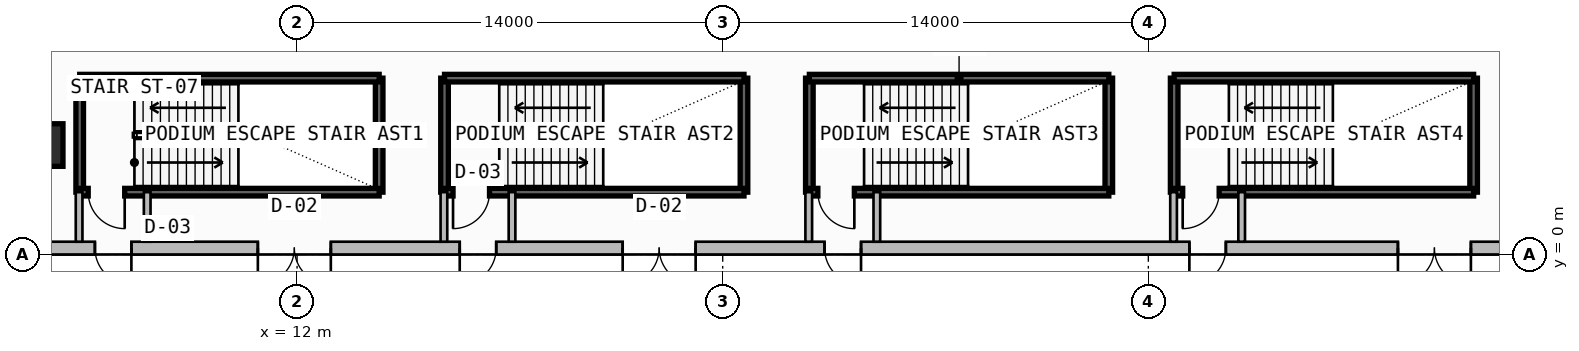
"""IFC4 building model, lengths in metres.
Left out: names, types, materials, properties, quantities, classifications, styles, units other than length and angle.
Written with IfcOpenShell. Run it as: python <this file> out.ifc"""

import sys

from ifc_helpers import new_model, si_unit, direction, frame, frame_2d, origin, origin_2d, place, context, subcontext, project, spatial, rectangle, extrude, element, fill, save


model = new_model("IFC4")
c1 = context("Model", 3, precision=1e-05, world=origin(), true_north=direction((0.0, 1.0)))
c2 = subcontext(c1, "Body", "Model", "MODEL_VIEW")
j1 = project(units=[si_unit("LENGTHUNIT", "METRE"), si_unit("PLANEANGLEUNIT", "RADIAN")], contexts=[c1])
p1 = place(None, origin())
s1 = spatial("IfcSite", under=j1, at=p1, CompositionType="ELEMENT")
p2 = place(p1, origin())
s2 = spatial("IfcBuilding", under=s1, at=p2, CompositionType="ELEMENT")
p3 = place(p2, origin())
s3 = spatial("IfcBuildingStorey", under=s2, at=p3, CompositionType="ELEMENT", Elevation=0.0)
p4 = place(p3, frame((3.6, 3.6, 0.0), z_axis=(0.0, 0.0, 1.0), x_axis=(1.0, 0.0, 0.0)))
e1 = element("IfcColumn", 1, at=p4, inside=s3, PredefinedType="COLUMN", context=c2, shape_type="SweptSolid", body=[
    extrude(rectangle(XDim=1.4, YDim=1.4, at=origin_2d()), origin(), (0.0, 0.0, 1.0), 4.5),
])
p5 = place(p3, frame((0.21, 0.21, 0.0), z_axis=(0.0, 0.0, 1.0), x_axis=(1.0, 0.0, 0.0)))
e2 = element("IfcWall", 2, at=p5, inside=s3, PredefinedType="SOLIDWALL", context=c2, shape_type="SweptSolid", body=[
    extrude(rectangle(XDim=51.79, YDim=0.42, at=frame_2d((25.895, 0.0))), origin(), (0.0, 0.0, 1.0), 4.18),
])
p6 = place(p5, frame((0.95, 0.0, 0.0)))
e3 = element("IfcOpeningElement", 3, at=p6, cuts=e2, PredefinedType="OPENING", context=c2, shape_type="SweptSolid", body=[
    extrude(rectangle(XDim=2.4, YDim=2.4, at=frame_2d((1.2, 1.2))), frame((0.0, 0.22, 0.0), z_axis=(0.0, -1.0, 0.0), x_axis=(1.0, 0.0, 0.0)), (0.0, 0.0, 1.0), 0.44),
])
p7 = place(p5, frame((10.5, 0.0, 0.0)))
e4 = element("IfcOpeningElement", 4, at=p7, cuts=e2, PredefinedType="OPENING", context=c2, shape_type="SweptSolid", body=[
    extrude(rectangle(XDim=2.4, YDim=2.4, at=frame_2d((1.2, 1.2))), frame((0.0, 0.22, 0.0), z_axis=(0.0, -1.0, 0.0), x_axis=(1.0, 0.0, 0.0)), (0.0, 0.0, 1.0), 0.44),
])
p8 = place(p5, frame((22.5, 0.0, 0.0)))
e5 = element("IfcOpeningElement", 5, at=p8, cuts=e2, PredefinedType="OPENING", context=c2, shape_type="SweptSolid", body=[
    extrude(rectangle(XDim=2.4, YDim=2.4, at=frame_2d((1.2, 1.2))), frame((0.0, 0.22, 0.0), z_axis=(0.0, -1.0, 0.0), x_axis=(1.0, 0.0, 0.0)), (0.0, 0.0, 1.0), 0.44),
])
p9 = place(p5, frame((48.0, 0.0, 0.0)))
e6 = element("IfcOpeningElement", 6, at=p9, cuts=e2, PredefinedType="OPENING", context=c2, shape_type="SweptSolid", body=[
    extrude(rectangle(XDim=2.4, YDim=2.4, at=frame_2d((1.2, 1.2))), frame((0.0, 0.22, 0.0), z_axis=(0.0, -1.0, 0.0), x_axis=(1.0, 0.0, 0.0)), (0.0, 0.0, 1.0), 0.44),
])
p10 = place(p5, frame((5.14, 0.0, 0.0)))
e7 = element("IfcOpeningElement", 7, at=p10, cuts=e2, PredefinedType="OPENING", context=c2, shape_type="SweptSolid", body=[
    extrude(rectangle(XDim=1.2, YDim=2.2, at=frame_2d((0.6, 1.1))), frame((0.0, 0.22, 0.0), z_axis=(0.0, -1.0, 0.0), x_axis=(1.0, 0.0, 0.0)), (0.0, 0.0, 1.0), 0.44),
])
p11 = place(p5, frame((17.14, 0.0, 0.0)))
e8 = element("IfcOpeningElement", 8, at=p11, cuts=e2, PredefinedType="OPENING", context=c2, shape_type="SweptSolid", body=[
    extrude(rectangle(XDim=1.2, YDim=2.2, at=frame_2d((0.6, 1.1))), frame((0.0, 0.22, 0.0), z_axis=(0.0, -1.0, 0.0), x_axis=(1.0, 0.0, 0.0)), (0.0, 0.0, 1.0), 0.44),
])
p12 = place(p5, frame((29.14, 0.0, 0.0)))
e9 = element("IfcOpeningElement", 9, at=p12, cuts=e2, PredefinedType="OPENING", context=c2, shape_type="SweptSolid", body=[
    extrude(rectangle(XDim=1.2, YDim=2.2, at=frame_2d((0.6, 1.1))), frame((0.0, 0.22, 0.0), z_axis=(0.0, -1.0, 0.0), x_axis=(1.0, 0.0, 0.0)), (0.0, 0.0, 1.0), 0.44),
])
p13 = place(p5, frame((41.14, 0.0, 0.0)))
e10 = element("IfcOpeningElement", 10, at=p13, cuts=e2, PredefinedType="OPENING", context=c2, shape_type="SweptSolid", body=[
    extrude(rectangle(XDim=1.2, YDim=2.2, at=frame_2d((0.6, 1.1))), frame((0.0, 0.22, 0.0), z_axis=(0.0, -1.0, 0.0), x_axis=(1.0, 0.0, 0.0)), (0.0, 0.0, 1.0), 0.44),
])
for number, where, z_axis, x_axis in (
    (11, (4.85, 2.05, -0.4), (0.0, 0.0, 1.0), (0.0, 1.0, 0.0)),
    (12, (14.7, 2.05, -0.4), (0.0, 0.0, 1.0), (0.0, 1.0, 0.0)),
):
    element("IfcWall", number, at=place(p3, frame(where, z_axis=z_axis, x_axis=x_axis)), inside=s3, PredefinedType="SOLIDWALL", context=c2, shape_type="SweptSolid", body=[
        extrude(rectangle(XDim=3.75, YDim=0.25, at=frame_2d((1.875, 0.0))), origin(), (0.0, 0.0, 1.0), 4.58),
    ])
p14 = place(p3, frame((4.85, 2.05, -0.4), z_axis=(0.0, 0.0, 1.0), x_axis=(1.0, 0.0, 0.0)))
e13 = element("IfcWall", 13, at=p14, inside=s3, PredefinedType="SOLIDWALL", context=c2, shape_type="SweptSolid", body=[
    extrude(rectangle(XDim=9.85, YDim=0.25, at=frame_2d((4.925, 0.0))), origin(), (0.0, 0.0, 1.0), 4.58),
])
p15 = place(p14, frame((0.28, 0.0, 0.4)))
e14 = element("IfcOpeningElement", 14, at=p15, cuts=e13, PredefinedType="OPENING", context=c2, shape_type="SweptSolid", body=[
    extrude(rectangle(XDim=1.2, YDim=2.2, at=frame_2d((0.6, 1.1))), frame((0.0, 0.135, 0.0), z_axis=(0.0, -1.0, 0.0), x_axis=(1.0, 0.0, 0.0)), (0.0, 0.0, 1.0), 0.27),
])
p16 = place(p3, frame((4.85, 5.8, -0.4), z_axis=(0.0, 0.0, 1.0), x_axis=(1.0, 0.0, 0.0)))
e15 = element("IfcWall", 15, at=p16, inside=s3, PredefinedType="SOLIDWALL", context=c2, shape_type="SweptSolid", body=[
    extrude(rectangle(XDim=9.85, YDim=0.25, at=frame_2d((4.925, 0.0))), origin(), (0.0, 0.0, 1.0), 4.58),
])
for number, where, z_axis, x_axis in (
    (16, (4.83, 0.42, 0.0), (0.0, 0.0, 1.0), (0.0, 1.0, 0.0)),
    (17, (7.07, 0.42, 0.0), (0.0, 0.0, 1.0), (0.0, 1.0, 0.0)),
):
    element("IfcWall", number, at=place(p3, frame(where, z_axis=z_axis, x_axis=x_axis)), inside=s3, PredefinedType="SOLIDWALL", context=c2, shape_type="SweptSolid", body=[
        extrude(rectangle(XDim=1.63, YDim=0.22, at=frame_2d((0.815, 0.0))), origin(), (0.0, 0.0, 1.0), 4.18),
    ])
for number, where, z_axis, x_axis in (
    (18, (16.85, 2.05, -0.4), (0.0, 0.0, 1.0), (0.0, 1.0, 0.0)),
    (19, (26.7, 2.05, -0.4), (0.0, 0.0, 1.0), (0.0, 1.0, 0.0)),
):
    element("IfcWall", number, at=place(p3, frame(where, z_axis=z_axis, x_axis=x_axis)), inside=s3, PredefinedType="SOLIDWALL", context=c2, shape_type="SweptSolid", body=[
        extrude(rectangle(XDim=3.75, YDim=0.25, at=frame_2d((1.875, 0.0))), origin(), (0.0, 0.0, 1.0), 4.58),
    ])
p17 = place(p3, frame((16.85, 2.05, -0.4), z_axis=(0.0, 0.0, 1.0), x_axis=(1.0, 0.0, 0.0)))
e20 = element("IfcWall", 20, at=p17, inside=s3, PredefinedType="SOLIDWALL", context=c2, shape_type="SweptSolid", body=[
    extrude(rectangle(XDim=9.85, YDim=0.25, at=frame_2d((4.925, 0.0))), origin(), (0.0, 0.0, 1.0), 4.58),
])
p18 = place(p17, frame((0.28, 0.0, 0.4)))
e21 = element("IfcOpeningElement", 21, at=p18, cuts=e20, PredefinedType="OPENING", context=c2, shape_type="SweptSolid", body=[
    extrude(rectangle(XDim=1.2, YDim=2.2, at=frame_2d((0.6, 1.1))), frame((0.0, 0.135, 0.0), z_axis=(0.0, -1.0, 0.0), x_axis=(1.0, 0.0, 0.0)), (0.0, 0.0, 1.0), 0.27),
])
p19 = place(p3, frame((16.85, 5.8, -0.4), z_axis=(0.0, 0.0, 1.0), x_axis=(1.0, 0.0, 0.0)))
e22 = element("IfcWall", 22, at=p19, inside=s3, PredefinedType="SOLIDWALL", context=c2, shape_type="SweptSolid", body=[
    extrude(rectangle(XDim=9.85, YDim=0.25, at=frame_2d((4.925, 0.0))), origin(), (0.0, 0.0, 1.0), 4.58),
])
for number, where, z_axis, x_axis in (
    (23, (16.83, 0.42, 0.0), (0.0, 0.0, 1.0), (0.0, 1.0, 0.0)),
    (24, (19.07, 0.42, 0.0), (0.0, 0.0, 1.0), (0.0, 1.0, 0.0)),
):
    element("IfcWall", number, at=place(p3, frame(where, z_axis=z_axis, x_axis=x_axis)), inside=s3, PredefinedType="SOLIDWALL", context=c2, shape_type="SweptSolid", body=[
        extrude(rectangle(XDim=1.63, YDim=0.22, at=frame_2d((0.815, 0.0))), origin(), (0.0, 0.0, 1.0), 4.18),
    ])
for number, where, z_axis, x_axis in (
    (25, (28.85, 2.05, -0.4), (0.0, 0.0, 1.0), (0.0, 1.0, 0.0)),
    (26, (38.7, 2.05, -0.4), (0.0, 0.0, 1.0), (0.0, 1.0, 0.0)),
):
    element("IfcWall", number, at=place(p3, frame(where, z_axis=z_axis, x_axis=x_axis)), inside=s3, PredefinedType="SOLIDWALL", context=c2, shape_type="SweptSolid", body=[
        extrude(rectangle(XDim=3.75, YDim=0.25, at=frame_2d((1.875, 0.0))), origin(), (0.0, 0.0, 1.0), 4.58),
    ])
p20 = place(p3, frame((28.85, 2.05, -0.4), z_axis=(0.0, 0.0, 1.0), x_axis=(1.0, 0.0, 0.0)))
e27 = element("IfcWall", 27, at=p20, inside=s3, PredefinedType="SOLIDWALL", context=c2, shape_type="SweptSolid", body=[
    extrude(rectangle(XDim=9.85, YDim=0.25, at=frame_2d((4.925, 0.0))), origin(), (0.0, 0.0, 1.0), 4.58),
])
p21 = place(p20, frame((0.28, 0.0, 0.4)))
e28 = element("IfcOpeningElement", 28, at=p21, cuts=e27, PredefinedType="OPENING", context=c2, shape_type="SweptSolid", body=[
    extrude(rectangle(XDim=1.2, YDim=2.2, at=frame_2d((0.6, 1.1))), frame((0.0, 0.135, 0.0), z_axis=(0.0, -1.0, 0.0), x_axis=(1.0, 0.0, 0.0)), (0.0, 0.0, 1.0), 0.27),
])
p22 = place(p3, frame((28.85, 5.8, -0.4), z_axis=(0.0, 0.0, 1.0), x_axis=(1.0, 0.0, 0.0)))
e29 = element("IfcWall", 29, at=p22, inside=s3, PredefinedType="SOLIDWALL", context=c2, shape_type="SweptSolid", body=[
    extrude(rectangle(XDim=9.85, YDim=0.25, at=frame_2d((4.925, 0.0))), origin(), (0.0, 0.0, 1.0), 4.58),
])
for number, where, z_axis, x_axis in (
    (30, (28.83, 0.42, 0.0), (0.0, 0.0, 1.0), (0.0, 1.0, 0.0)),
    (31, (31.07, 0.42, 0.0), (0.0, 0.0, 1.0), (0.0, 1.0, 0.0)),
):
    element("IfcWall", number, at=place(p3, frame(where, z_axis=z_axis, x_axis=x_axis)), inside=s3, PredefinedType="SOLIDWALL", context=c2, shape_type="SweptSolid", body=[
        extrude(rectangle(XDim=1.63, YDim=0.22, at=frame_2d((0.815, 0.0))), origin(), (0.0, 0.0, 1.0), 4.18),
    ])
for number, where, z_axis, x_axis in (
    (32, (40.85, 2.05, -0.4), (0.0, 0.0, 1.0), (0.0, 1.0, 0.0)),
    (33, (50.7, 2.05, -0.4), (0.0, 0.0, 1.0), (0.0, 1.0, 0.0)),
):
    element("IfcWall", number, at=place(p3, frame(where, z_axis=z_axis, x_axis=x_axis)), inside=s3, PredefinedType="SOLIDWALL", context=c2, shape_type="SweptSolid", body=[
        extrude(rectangle(XDim=3.75, YDim=0.25, at=frame_2d((1.875, 0.0))), origin(), (0.0, 0.0, 1.0), 4.58),
    ])
p23 = place(p3, frame((40.85, 2.05, -0.4), z_axis=(0.0, 0.0, 1.0), x_axis=(1.0, 0.0, 0.0)))
e34 = element("IfcWall", 34, at=p23, inside=s3, PredefinedType="SOLIDWALL", context=c2, shape_type="SweptSolid", body=[
    extrude(rectangle(XDim=9.85, YDim=0.25, at=frame_2d((4.925, 0.0))), origin(), (0.0, 0.0, 1.0), 4.58),
])
p24 = place(p23, frame((0.28, 0.0, 0.4)))
e35 = element("IfcOpeningElement", 35, at=p24, cuts=e34, PredefinedType="OPENING", context=c2, shape_type="SweptSolid", body=[
    extrude(rectangle(XDim=1.2, YDim=2.2, at=frame_2d((0.6, 1.1))), frame((0.0, 0.135, 0.0), z_axis=(0.0, -1.0, 0.0), x_axis=(1.0, 0.0, 0.0)), (0.0, 0.0, 1.0), 0.27),
])
p25 = place(p3, frame((40.85, 5.8, -0.4), z_axis=(0.0, 0.0, 1.0), x_axis=(1.0, 0.0, 0.0)))
e36 = element("IfcWall", 36, at=p25, inside=s3, PredefinedType="SOLIDWALL", context=c2, shape_type="SweptSolid", body=[
    extrude(rectangle(XDim=9.85, YDim=0.25, at=frame_2d((4.925, 0.0))), origin(), (0.0, 0.0, 1.0), 4.58),
])
for number, where, z_axis, x_axis in (
    (37, (40.83, 0.42, 0.0), (0.0, 0.0, 1.0), (0.0, 1.0, 0.0)),
    (38, (43.07, 0.42, 0.0), (0.0, 0.0, 1.0), (0.0, 1.0, 0.0)),
):
    element("IfcWall", number, at=place(p3, frame(where, z_axis=z_axis, x_axis=x_axis)), inside=s3, PredefinedType="SOLIDWALL", context=c2, shape_type="SweptSolid", body=[
        extrude(rectangle(XDim=1.63, YDim=0.22, at=frame_2d((0.815, 0.0))), origin(), (0.0, 0.0, 1.0), 4.18),
    ])
p26 = place(p7, frame((2.4, 0.0, 0.0), z_axis=(0.0, 0.0, 1.0), x_axis=(-1.0, 0.0, 0.0)))
e39 = element("IfcDoor", 39, at=p26, inside=s3, OperationType="DOUBLE_DOOR_SINGLE_SWING", PredefinedType="USERDEFINED", context=c2, shape_type="SweptSolid", body=[
    extrude(rectangle(XDim=2.4, YDim=2.4, at=frame_2d((1.2, 1.2))), frame((0.0, 0.025, 0.0), z_axis=(0.0, -1.0, 0.0), x_axis=(1.0, 0.0, 0.0)), (0.0, 0.0, 1.0), 0.05),
])
fill(e4, e39)
p27 = place(p8, frame((2.4, 0.0, 0.0), z_axis=(0.0, 0.0, 1.0), x_axis=(-1.0, 0.0, 0.0)))
e40 = element("IfcDoor", 40, at=p27, inside=s3, OperationType="DOUBLE_DOOR_SINGLE_SWING", PredefinedType="USERDEFINED", context=c2, shape_type="SweptSolid", body=[
    extrude(rectangle(XDim=2.4, YDim=2.4, at=frame_2d((1.2, 1.2))), frame((0.0, 0.025, 0.0), z_axis=(0.0, -1.0, 0.0), x_axis=(1.0, 0.0, 0.0)), (0.0, 0.0, 1.0), 0.05),
])
fill(e5, e40)
p28 = place(p9, frame((2.4, 0.0, 0.0), z_axis=(0.0, 0.0, 1.0), x_axis=(-1.0, 0.0, 0.0)))
e41 = element("IfcDoor", 41, at=p28, inside=s3, OperationType="DOUBLE_DOOR_SINGLE_SWING", PredefinedType="USERDEFINED", context=c2, shape_type="SweptSolid", body=[
    extrude(rectangle(XDim=2.4, YDim=2.4, at=frame_2d((1.2, 1.2))), frame((0.0, 0.025, 0.0), z_axis=(0.0, -1.0, 0.0), x_axis=(1.0, 0.0, 0.0)), (0.0, 0.0, 1.0), 0.05),
])
fill(e6, e41)
p29 = place(p10, frame((1.2, 0.0, 0.0), z_axis=(0.0, 0.0, 1.0), x_axis=(-1.0, 0.0, 0.0)))
e42 = element("IfcDoor", 42, at=p29, inside=s3, OperationType="SINGLE_SWING_LEFT", PredefinedType="USERDEFINED", context=c2, shape_type="SweptSolid", body=[
    extrude(rectangle(XDim=1.2, YDim=2.2, at=frame_2d((0.6, 1.1))), frame((0.0, 0.025, 0.0), z_axis=(0.0, -1.0, 0.0), x_axis=(1.0, 0.0, 0.0)), (0.0, 0.0, 1.0), 0.05),
])
fill(e7, e42)
p30 = place(p11, frame((1.2, 0.0, 0.0), z_axis=(0.0, 0.0, 1.0), x_axis=(-1.0, 0.0, 0.0)))
e43 = element("IfcDoor", 43, at=p30, inside=s3, OperationType="SINGLE_SWING_RIGHT", PredefinedType="USERDEFINED", context=c2, shape_type="SweptSolid", body=[
    extrude(rectangle(XDim=1.2, YDim=2.2, at=frame_2d((0.6, 1.1))), frame((0.0, 0.025, 0.0), z_axis=(0.0, -1.0, 0.0), x_axis=(1.0, 0.0, 0.0)), (0.0, 0.0, 1.0), 0.05),
])
fill(e8, e43)
p31 = place(p12, frame((1.2, 0.0, 0.0), z_axis=(0.0, 0.0, 1.0), x_axis=(-1.0, 0.0, 0.0)))
e44 = element("IfcDoor", 44, at=p31, inside=s3, OperationType="SINGLE_SWING_LEFT", PredefinedType="USERDEFINED", context=c2, shape_type="SweptSolid", body=[
    extrude(rectangle(XDim=1.2, YDim=2.2, at=frame_2d((0.6, 1.1))), frame((0.0, 0.025, 0.0), z_axis=(0.0, -1.0, 0.0), x_axis=(1.0, 0.0, 0.0)), (0.0, 0.0, 1.0), 0.05),
])
fill(e9, e44)
p32 = place(p13, frame((1.2, 0.0, 0.0), z_axis=(0.0, 0.0, 1.0), x_axis=(-1.0, 0.0, 0.0)))
e45 = element("IfcDoor", 45, at=p32, inside=s3, OperationType="SINGLE_SWING_RIGHT", PredefinedType="USERDEFINED", context=c2, shape_type="SweptSolid", body=[
    extrude(rectangle(XDim=1.2, YDim=2.2, at=frame_2d((0.6, 1.1))), frame((0.0, 0.025, 0.0), z_axis=(0.0, -1.0, 0.0), x_axis=(1.0, 0.0, 0.0)), (0.0, 0.0, 1.0), 0.05),
])
fill(e10, e45)
p33 = place(p15, frame((1.2, 0.0, 0.0), z_axis=(0.0, 0.0, 1.0), x_axis=(-1.0, 0.0, 0.0)))
e46 = element("IfcDoor", 46, at=p33, inside=s3, OperationType="SINGLE_SWING_LEFT", PredefinedType="USERDEFINED", context=c2, shape_type="SweptSolid", body=[
    extrude(rectangle(XDim=1.2, YDim=2.2, at=frame_2d((0.6, 1.1))), frame((0.0, 0.025, 0.0), z_axis=(0.0, -1.0, 0.0), x_axis=(1.0, 0.0, 0.0)), (0.0, 0.0, 1.0), 0.05),
])
fill(e14, e46)
p34 = place(p18, frame((1.2, 0.0, 0.0), z_axis=(0.0, 0.0, 1.0), x_axis=(-1.0, 0.0, 0.0)))
e47 = element("IfcDoor", 47, at=p34, inside=s3, OperationType="SINGLE_SWING_RIGHT", PredefinedType="USERDEFINED", context=c2, shape_type="SweptSolid", body=[
    extrude(rectangle(XDim=1.2, YDim=2.2, at=frame_2d((0.6, 1.1))), frame((0.0, 0.025, 0.0), z_axis=(0.0, -1.0, 0.0), x_axis=(1.0, 0.0, 0.0)), (0.0, 0.0, 1.0), 0.05),
])
fill(e21, e47)
p35 = place(p21, frame((1.2, 0.0, 0.0), z_axis=(0.0, 0.0, 1.0), x_axis=(-1.0, 0.0, 0.0)))
e48 = element("IfcDoor", 48, at=p35, inside=s3, OperationType="SINGLE_SWING_LEFT", PredefinedType="USERDEFINED", context=c2, shape_type="SweptSolid", body=[
    extrude(rectangle(XDim=1.2, YDim=2.2, at=frame_2d((0.6, 1.1))), frame((0.0, 0.025, 0.0), z_axis=(0.0, -1.0, 0.0), x_axis=(1.0, 0.0, 0.0)), (0.0, 0.0, 1.0), 0.05),
])
fill(e28, e48)
p36 = place(p24, frame((1.2, 0.0, 0.0), z_axis=(0.0, 0.0, 1.0), x_axis=(-1.0, 0.0, 0.0)))
e49 = element("IfcDoor", 49, at=p36, inside=s3, OperationType="SINGLE_SWING_RIGHT", PredefinedType="USERDEFINED", context=c2, shape_type="SweptSolid", body=[
    extrude(rectangle(XDim=1.2, YDim=2.2, at=frame_2d((0.6, 1.1))), frame((0.0, 0.025, 0.0), z_axis=(0.0, -1.0, 0.0), x_axis=(1.0, 0.0, 0.0)), (0.0, 0.0, 1.0), 0.05),
])
fill(e35, e49)
save(model, sys.argv[1])
